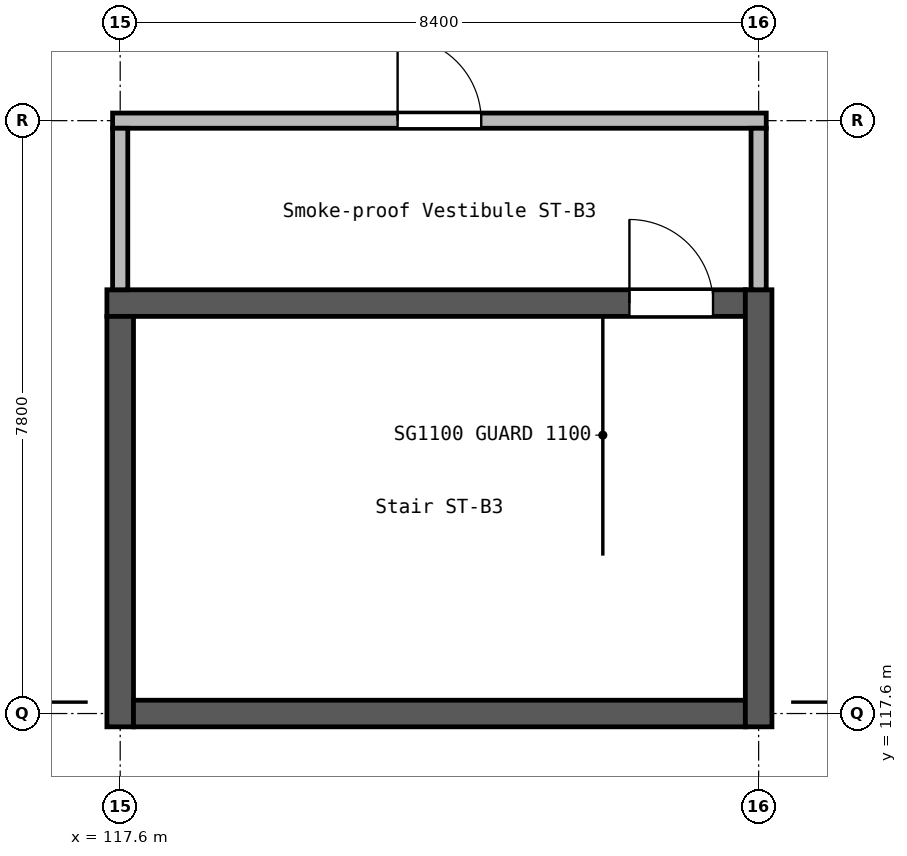
"""IFC4 building model, lengths in metres.
Left out: names, types, materials, properties, quantities, classifications, styles, units other than length and angle.
Written with IfcOpenShell. Run it as: python <this file> out.ifc"""

import sys

from ifc_helpers import new_model, si_unit, direction, frame, frame_2d, origin, place, context, subcontext, project, spatial, rectangle, extrude, element, fill, save


model = new_model("IFC4")
c1 = context("Model", 3, precision=1e-05, world=origin(), true_north=direction((0.0, 1.0)))
c2 = subcontext(c1, "Body", "Model", "MODEL_VIEW")
j1 = project(units=[si_unit("LENGTHUNIT", "METRE"), si_unit("PLANEANGLEUNIT", "RADIAN")], contexts=[c1])
p1 = place(None, origin())
s1 = spatial("IfcSite", under=j1, at=p1, CompositionType="ELEMENT")
p2 = place(p1, origin())
s2 = spatial("IfcBuilding", under=s1, at=p2, CompositionType="ELEMENT")
p3 = place(p2, frame((0.0, 0.0, 28.8)))
s3 = spatial("IfcBuildingStorey", under=s2, at=p3, CompositionType="ELEMENT", Elevation=28.8)
p4 = place(p3, frame((117.425, 123.0, 0.0), z_axis=(0.0, 0.0, 1.0), x_axis=(1.0, 0.0, 0.0)))
e1 = element("IfcWall", 1, at=p4, inside=s3, PredefinedType="SHEAR", context=c2, shape_type="SweptSolid", body=[
    extrude(rectangle(XDim=8.4, YDim=0.35, at=frame_2d((4.2, 0.0))), origin(), (0.0, 0.0, 1.0), 3.7),
])
p5 = place(p4, frame((6.875, 0.0, 0.0)))
e2 = element("IfcOpeningElement", 2, at=p5, cuts=e1, PredefinedType="OPENING", context=c2, shape_type="SweptSolid", body=[
    extrude(rectangle(XDim=1.1, YDim=2.1, at=frame_2d((0.55, 1.05))), frame((0.0, 0.185, 0.0), z_axis=(0.0, -1.0, 0.0), x_axis=(1.0, 0.0, 0.0)), (0.0, 0.0, 1.0), 0.37),
])
p6 = place(p3, frame((117.6, 117.425, 0.0), z_axis=(0.0, 0.0, 1.0), x_axis=(0.0, 1.0, 0.0)))
e3 = element("IfcWall", 3, at=p6, inside=s3, PredefinedType="SHEAR", context=c2, shape_type="SweptSolid", body=[
    extrude(rectangle(XDim=5.4, YDim=0.35, at=frame_2d((2.7, 0.0))), origin(), (0.0, 0.0, 1.0), 3.7),
])
p7 = place(p3, frame((117.775, 117.6, 0.0), z_axis=(0.0, 0.0, 1.0), x_axis=(1.0, 0.0, 0.0)))
e4 = element("IfcWall", 4, at=p7, inside=s3, PredefinedType="SHEAR", context=c2, shape_type="SweptSolid", body=[
    extrude(rectangle(XDim=8.05, YDim=0.35, at=frame_2d((4.025, 0.0))), origin(), (0.0, 0.0, 1.0), 3.7),
])
p8 = place(p3, frame((126.0, 117.425, 0.0), z_axis=(0.0, 0.0, 1.0), x_axis=(0.0, 1.0, 0.0)))
e5 = element("IfcWall", 5, at=p8, inside=s3, PredefinedType="SHEAR", context=c2, shape_type="SweptSolid", body=[
    extrude(rectangle(XDim=5.75, YDim=0.35, at=frame_2d((2.875, 0.0))), origin(), (0.0, 0.0, 1.0), 3.7),
])
p9 = place(p3, frame((117.5, 125.4, 0.0), z_axis=(0.0, 0.0, 1.0), x_axis=(1.0, 0.0, 0.0)))
e6 = element("IfcWall", 6, at=p9, inside=s3, PredefinedType="SOLIDWALL", context=c2, shape_type="SweptSolid", body=[
    extrude(rectangle(XDim=8.6, YDim=0.2, at=frame_2d((4.3, 0.0))), origin(), (0.0, 0.0, 1.0), 3.6),
])
p10 = place(p9, frame((3.75, 0.0, 0.0)))
e7 = element("IfcOpeningElement", 7, at=p10, cuts=e6, PredefinedType="OPENING", context=c2, shape_type="SweptSolid", body=[
    extrude(rectangle(XDim=1.1, YDim=2.1, at=frame_2d((0.55, 1.05))), frame((0.0, 0.11, 0.0), z_axis=(0.0, -1.0, 0.0), x_axis=(1.0, 0.0, 0.0)), (0.0, 0.0, 1.0), 0.22),
])
for number, where, z_axis, x_axis in (
    (8, (117.6, 123.175, 0.0), (0.0, 0.0, 1.0), (0.0, 1.0, 0.0)),
    (9, (126.0, 123.175, 0.0), (0.0, 0.0, 1.0), (0.0, 1.0, 0.0)),
):
    element("IfcWall", number, at=place(p3, frame(where, z_axis=z_axis, x_axis=x_axis)), inside=s3, PredefinedType="SOLIDWALL", context=c2, shape_type="SweptSolid", body=[
        extrude(rectangle(XDim=2.125, YDim=0.2, at=frame_2d((1.062, 0.0))), origin(), (0.0, 0.0, 1.0), 3.6),
    ])
p11 = place(p5, frame((1.1, 0.0, 0.0), z_axis=(0.0, 0.0, 1.0), x_axis=(-1.0, 0.0, 0.0)))
e10 = element("IfcDoor", 10, at=p11, inside=s3, OperationType="SINGLE_SWING_LEFT", PredefinedType="DOOR", context=c2, shape_type="SweptSolid", body=[
    extrude(rectangle(XDim=1.1, YDim=2.1, at=frame_2d((0.55, 1.05))), frame((0.0, 0.025, 0.0), z_axis=(0.0, -1.0, 0.0), x_axis=(1.0, 0.0, 0.0)), (0.0, 0.0, 1.0), 0.05),
])
fill(e2, e10)
p12 = place(p10, frame((1.1, 0.0, 0.0), z_axis=(0.0, 0.0, 1.0), x_axis=(-1.0, 0.0, 0.0)))
e11 = element("IfcDoor", 11, at=p12, inside=s3, OperationType="SINGLE_SWING_LEFT", PredefinedType="DOOR", context=c2, shape_type="SweptSolid", body=[
    extrude(rectangle(XDim=1.1, YDim=2.1, at=frame_2d((0.55, 1.05))), frame((0.0, 0.025, 0.0), z_axis=(0.0, -1.0, 0.0), x_axis=(1.0, 0.0, 0.0)), (0.0, 0.0, 1.0), 0.05),
])
fill(e7, e11)
save(model, sys.argv[1])
